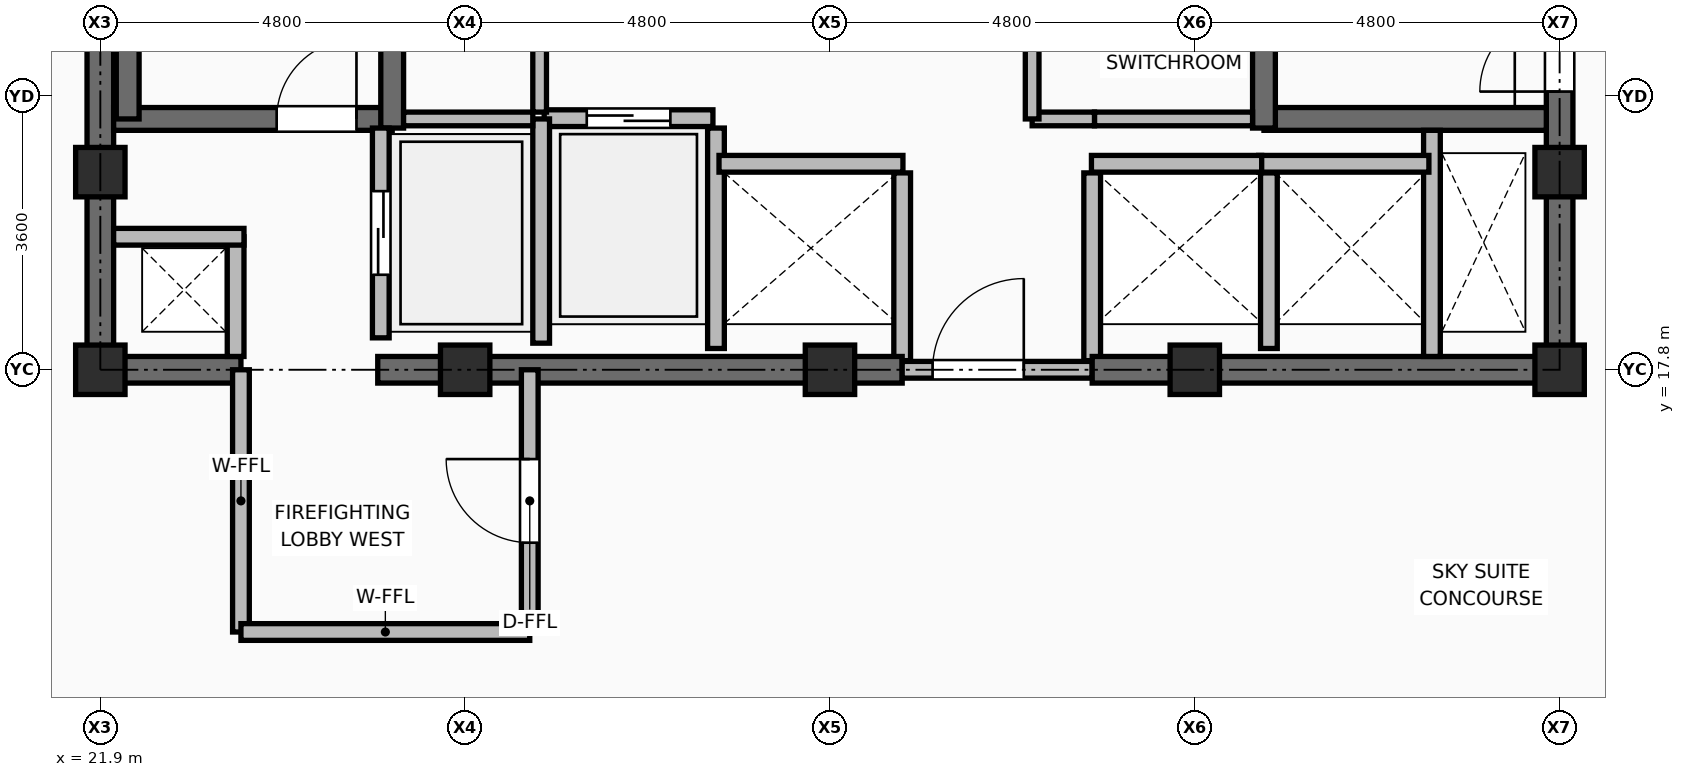
"""IFC4 building model, lengths in metres.
Left out: names, types, materials, properties, quantities, classifications, styles, units other than length and angle.
Written with IfcOpenShell. Run it as: python <this file> out.ifc"""

import sys

from ifc_helpers import new_model, si_unit, direction, frame, frame_2d, origin, origin_2d, place, context, subcontext, project, spatial, rectangle, extrude, element, fill, save


model = new_model("IFC4")
c1 = context("Model", 3, precision=1e-05, world=origin(), true_north=direction((0.0, 1.0)))
c2 = subcontext(c1, "Body", "Model", "MODEL_VIEW")
j1 = project(units=[si_unit("LENGTHUNIT", "METRE"), si_unit("PLANEANGLEUNIT", "RADIAN")], contexts=[c1])
p1 = place(None, origin())
s1 = spatial("IfcSite", under=j1, at=p1, CompositionType="ELEMENT")
p2 = place(p1, origin())
s2 = spatial("IfcBuilding", under=s1, at=p2, CompositionType="ELEMENT")
p3 = place(p2, frame((0.0, 0.0, 275.1)))
s3 = spatial("IfcBuildingStorey", under=s2, at=p3, CompositionType="ELEMENT", Elevation=275.1)
for number, where, z_axis, x_axis in (
    (1, (21.9, 17.8, 0.0), (0.0, 0.0, 1.0), (1.0, 0.0, 0.0)),
    (2, (26.7, 17.8, 0.0), (0.0, 0.0, 1.0), (1.0, 0.0, 0.0)),
    (3, (31.5, 17.8, 0.0), (0.0, 0.0, 1.0), (1.0, 0.0, 0.0)),
    (4, (36.3, 17.8, 0.0), (0.0, 0.0, 1.0), (1.0, 0.0, 0.0)),
    (5, (41.1, 17.8, 0.0), (0.0, 0.0, 1.0), (1.0, 0.0, 0.0)),
    (6, (21.9, 20.4, 0.0), (0.0, 0.0, 1.0), (1.0, 0.0, 0.0)),
    (7, (41.1, 20.4, 0.0), (0.0, 0.0, 1.0), (1.0, 0.0, 0.0)),
):
    element("IfcColumn", number, at=place(p3, frame(where, z_axis=z_axis, x_axis=x_axis)), inside=s3, PredefinedType="COLUMN", context=c2, shape_type="SweptSolid", body=[
        extrude(rectangle(XDim=0.65, YDim=0.65, at=origin_2d()), origin(), (0.0, 0.0, 1.0), 3.75),
    ])
p4 = place(p3, frame((30.0, 18.08, 0.0), z_axis=(0.0, 0.0, 1.0), x_axis=(0.0, 1.0, 0.0)))
e8 = element("IfcWall", 8, at=p4, inside=s3, PredefinedType="PARTITIONING", context=c2, shape_type="SweptSolid", body=[
    extrude(rectangle(XDim=2.9, YDim=0.22, at=frame_2d((1.45, 0.0))), origin(), (0.0, 0.0, 1.0), 3.545),
])
for number, where, z_axis, x_axis in (
    (9, (32.45, 17.92, 0.0), (0.0, 0.0, 1.0), (0.0, 1.0, 0.0)),
    (10, (34.95, 17.92, 0.0), (0.0, 0.0, 1.0), (0.0, 1.0, 0.0)),
):
    element("IfcWall", number, at=place(p3, frame(where, z_axis=z_axis, x_axis=x_axis)), inside=s3, PredefinedType="PARTITIONING", context=c2, shape_type="SweptSolid", body=[
        extrude(rectangle(XDim=2.47, YDim=0.22, at=frame_2d((1.235, 0.0))), origin(), (0.0, 0.0, 1.0), 3.545),
    ])
p5 = place(p3, frame((37.275, 18.08, 0.0), z_axis=(0.0, 0.0, 1.0), x_axis=(0.0, 1.0, 0.0)))
e11 = element("IfcWall", 11, at=p5, inside=s3, PredefinedType="PARTITIONING", context=c2, shape_type="SweptSolid", body=[
    extrude(rectangle(XDim=2.31, YDim=0.22, at=frame_2d((1.155, 0.0))), origin(), (0.0, 0.0, 1.0), 3.545),
])
p6 = place(p3, frame((21.725, 17.8, 0.0), z_axis=(0.0, 0.0, 1.0), x_axis=(1.0, 0.0, 0.0)))
e12 = element("IfcWall", 12, at=p6, inside=s3, PredefinedType="SHEAR", context=c2, shape_type="SweptSolid", body=[
    extrude(rectangle(XDim=2.025, YDim=0.35, at=frame_2d((1.012, 0.0))), origin(), (0.0, 0.0, 1.0), 3.57),
])
p7 = place(p3, frame((25.55, 17.8, 0.0), z_axis=(0.0, 0.0, 1.0), x_axis=(1.0, 0.0, 0.0)))
e13 = element("IfcWall", 13, at=p7, inside=s3, PredefinedType="SHEAR", context=c2, shape_type="SweptSolid", body=[
    extrude(rectangle(XDim=6.9, YDim=0.35, at=frame_2d((3.45, 0.0))), origin(), (0.0, 0.0, 1.0), 3.57),
])
p8 = place(p3, frame((32.45, 17.8, 0.0), z_axis=(0.0, 0.0, 1.0), x_axis=(1.0, 0.0, 0.0)))
e14 = element("IfcWall", 14, at=p8, inside=s3, PredefinedType="PARTITIONING", context=c2, shape_type="SweptSolid", body=[
    extrude(rectangle(XDim=2.5, YDim=0.22, at=frame_2d((1.25, 0.0))), origin(), (0.0, 0.0, 1.0), 3.132),
])
p9 = place(p8, frame((0.4, 0.0, 0.0)))
e15 = element("IfcOpeningElement", 15, at=p9, cuts=e14, PredefinedType="OPENING", context=c2, shape_type="SweptSolid", body=[
    extrude(rectangle(XDim=1.2, YDim=2.1, at=frame_2d((0.6, 1.05))), frame((0.0, 0.12, 0.0), z_axis=(0.0, -1.0, 0.0), x_axis=(1.0, 0.0, 0.0)), (0.0, 0.0, 1.0), 0.24),
])
p10 = place(p3, frame((34.95, 17.8, 0.0), z_axis=(0.0, 0.0, 1.0), x_axis=(1.0, 0.0, 0.0)))
e16 = element("IfcWall", 16, at=p10, inside=s3, PredefinedType="SHEAR", context=c2, shape_type="SweptSolid", body=[
    extrude(rectangle(XDim=6.325, YDim=0.35, at=frame_2d((3.163, 0.0))), origin(), (0.0, 0.0, 1.0), 3.57),
])
p11 = place(p3, frame((21.9, 17.975, 0.0), z_axis=(0.0, 0.0, 1.0), x_axis=(0.0, 1.0, 0.0)))
e17 = element("IfcWall", 17, at=p11, inside=s3, PredefinedType="SHEAR", context=c2, shape_type="SweptSolid", body=[
    extrude(rectangle(XDim=14.3, YDim=0.35, at=frame_2d((7.15, 0.0))), origin(), (0.0, 0.0, 1.0), 3.57),
])
p12 = place(p3, frame((41.1, 17.975, 0.0), z_axis=(0.0, 0.0, 1.0), x_axis=(0.0, 1.0, 0.0)))
e18 = element("IfcWall", 18, at=p12, inside=s3, PredefinedType="SHEAR", context=c2, shape_type="SweptSolid", body=[
    extrude(rectangle(XDim=14.3, YDim=0.35, at=frame_2d((7.15, 0.0))), origin(), (0.0, 0.0, 1.0), 3.57),
])
p13 = place(p12, frame((3.485, 0.0, 0.0)))
e19 = element("IfcOpeningElement", 19, at=p13, cuts=e18, PredefinedType="OPENING", context=c2, shape_type="SweptSolid", body=[
    extrude(rectangle(XDim=1.05, YDim=2.1, at=frame_2d((0.525, 1.05))), frame((0.0, 0.185, 0.0), z_axis=(0.0, -1.0, 0.0), x_axis=(1.0, 0.0, 0.0)), (0.0, 0.0, 1.0), 0.37),
])
p14 = place(p3, frame((22.075, 21.1, 0.0), z_axis=(0.0, 0.0, 1.0), x_axis=(1.0, 0.0, 0.0)))
e20 = element("IfcWall", 20, at=p14, inside=s3, PredefinedType="SHEAR", context=c2, shape_type="SweptSolid", body=[
    extrude(rectangle(XDim=3.665, YDim=0.3, at=frame_2d((1.833, 0.0))), origin(), (0.0, 0.0, 1.0), 3.57),
])
p15 = place(p14, frame((2.145, 0.0, 0.0)))
e21 = element("IfcOpeningElement", 21, at=p15, cuts=e20, PredefinedType="OPENING", context=c2, shape_type="SweptSolid", body=[
    extrude(rectangle(XDim=1.05, YDim=2.1, at=frame_2d((0.525, 1.05))), frame((0.0, 0.16, 0.0), z_axis=(0.0, -1.0, 0.0), x_axis=(1.0, 0.0, 0.0)), (0.0, 0.0, 1.0), 0.32),
])
p16 = place(p3, frame((25.74, 20.98, 0.0), z_axis=(0.0, 0.0, 1.0), x_axis=(0.0, 1.0, 0.0)))
e22 = element("IfcWall", 22, at=p16, inside=s3, PredefinedType="SHEAR", context=c2, shape_type="SweptSolid", body=[
    extrude(rectangle(XDim=7.99, YDim=0.3, at=frame_2d((3.995, 0.0))), origin(), (0.0, 0.0, 1.0), 3.57),
])
p17 = place(p3, frame((22.26, 21.1, 0.0), z_axis=(0.0, 0.0, 1.0), x_axis=(0.0, 1.0, 0.0)))
e23 = element("IfcWall", 23, at=p17, inside=s3, PredefinedType="SHEAR", context=c2, shape_type="SweptSolid", body=[
    extrude(rectangle(XDim=7.75, YDim=0.3, at=frame_2d((3.875, 0.0))), origin(), (0.0, 0.0, 1.0), 3.57),
])
p18 = place(p3, frame((37.21, 21.1, 0.0), z_axis=(0.0, 0.0, 1.0), x_axis=(1.0, 0.0, 0.0)))
e24 = element("IfcWall", 24, at=p18, inside=s3, PredefinedType="SHEAR", context=c2, shape_type="SweptSolid", body=[
    extrude(rectangle(XDim=3.715, YDim=0.3, at=frame_2d((1.857, 0.0))), origin(), (0.0, 0.0, 1.0), 3.57),
])
p19 = place(p3, frame((37.21, 20.98, 0.0), z_axis=(0.0, 0.0, 1.0), x_axis=(0.0, 1.0, 0.0)))
e25 = element("IfcWall", 25, at=p19, inside=s3, PredefinedType="SHEAR", context=c2, shape_type="SweptSolid", body=[
    extrude(rectangle(XDim=7.99, YDim=0.3, at=frame_2d((3.995, 0.0))), origin(), (0.0, 0.0, 1.0), 3.57),
])
p20 = place(p3, frame((23.68, 17.975, 0.0), z_axis=(0.0, 0.0, 1.0), x_axis=(0.0, 1.0, 0.0)))
e26 = element("IfcWall", 26, at=p20, inside=s3, PredefinedType="PARTITIONING", context=c2, shape_type="SweptSolid", body=[
    extrude(rectangle(XDim=1.575, YDim=0.22, at=frame_2d((0.788, 0.0))), origin(), (0.0, 0.0, 1.0), 3.132),
])
p21 = place(p3, frame((22.075, 19.55, 0.0), z_axis=(0.0, 0.0, 1.0), x_axis=(1.0, 0.0, 0.0)))
e27 = element("IfcWall", 27, at=p21, inside=s3, PredefinedType="PARTITIONING", context=c2, shape_type="SweptSolid", body=[
    extrude(rectangle(XDim=1.715, YDim=0.22, at=frame_2d((0.857, 0.0))), origin(), (0.0, 0.0, 1.0), 2.595),
])
p22 = place(p3, frame((39.42, 17.975, 0.0), z_axis=(0.0, 0.0, 1.0), x_axis=(0.0, 1.0, 0.0)))
e28 = element("IfcWall", 28, at=p22, inside=s3, PredefinedType="PARTITIONING", context=c2, shape_type="SweptSolid", body=[
    extrude(rectangle(XDim=2.975, YDim=0.22, at=frame_2d((1.487, 0.0))), origin(), (0.0, 0.0, 1.0), 3.132),
])
p23 = place(p3, frame((25.59, 18.22, 0.0), z_axis=(0.0, 0.0, 1.0), x_axis=(0.0, 1.0, 0.0)))
e29 = element("IfcWall", 29, at=p23, inside=s3, PredefinedType="PARTITIONING", context=c2, shape_type="SweptSolid", body=[
    extrude(rectangle(XDim=2.76, YDim=0.22, at=frame_2d((1.38, 0.0))), origin(), (0.0, 0.0, 1.0), 3.55),
])
p24 = place(p23, frame((0.83, 0.0, 0.0)))
e30 = element("IfcOpeningElement", 30, at=p24, cuts=e29, PredefinedType="OPENING", context=c2, shape_type="SweptSolid", body=[
    extrude(rectangle(XDim=1.1, YDim=2.2, at=frame_2d((0.55, 1.1))), frame((0.0, 0.12, 0.0), z_axis=(0.0, -1.0, 0.0), x_axis=(1.0, 0.0, 0.0)), (0.0, 0.0, 1.0), 0.24),
])
p25 = place(p3, frame((27.74, 21.11, 0.0), z_axis=(0.0, 0.0, 1.0), x_axis=(1.0, 0.0, 0.0)))
e31 = element("IfcWall", 31, at=p25, inside=s3, PredefinedType="PARTITIONING", context=c2, shape_type="SweptSolid", body=[
    extrude(rectangle(XDim=2.22, YDim=0.22, at=frame_2d((1.11, 0.0))), origin(), (0.0, 0.0, 1.0), 3.55),
])
p26 = place(p25, frame((0.56, 0.0, 0.0)))
e32 = element("IfcOpeningElement", 32, at=p26, cuts=e31, PredefinedType="OPENING", context=c2, shape_type="SweptSolid", body=[
    extrude(rectangle(XDim=1.1, YDim=2.2, at=frame_2d((0.55, 1.1))), frame((0.0, 0.12, 0.0), z_axis=(0.0, -1.0, 0.0), x_axis=(1.0, 0.0, 0.0)), (0.0, 0.0, 1.0), 0.24),
])
p27 = place(p3, frame((30.04, 20.51, 0.0), z_axis=(0.0, 0.0, 1.0), x_axis=(1.0, 0.0, 0.0)))
e33 = element("IfcWall", 33, at=p27, inside=s3, PredefinedType="PARTITIONING", context=c2, shape_type="SweptSolid", body=[
    extrude(rectangle(XDim=2.42, YDim=0.22, at=frame_2d((1.21, 0.0))), origin(), (0.0, 0.0, 1.0), 3.55),
])
for number, where, z_axis, x_axis in (
    (34, (37.14, 20.51, 0.0), (0.0, 0.0, 1.0), (1.0, 0.0, 0.0)),
    (35, (34.94, 20.51, 0.0), (0.0, 0.0, 1.0), (1.0, 0.0, 0.0)),
):
    element("IfcWall", number, at=place(p3, frame(where, z_axis=z_axis, x_axis=x_axis)), inside=s3, PredefinedType="PARTITIONING", context=c2, shape_type="SweptSolid", body=[
        extrude(rectangle(XDim=2.24, YDim=0.22, at=frame_2d((1.12, 0.0))), origin(), (0.0, 0.0, 1.0), 3.55),
    ])
p28 = place(p3, frame((27.7, 18.15, 0.0), z_axis=(0.0, 0.0, 1.0), x_axis=(0.0, 1.0, 0.0)))
e36 = element("IfcWall", 36, at=p28, inside=s3, PredefinedType="PARTITIONING", context=c2, shape_type="SweptSolid", body=[
    extrude(rectangle(XDim=2.95, YDim=0.22, at=frame_2d((1.475, 0.0))), origin(), (0.0, 0.0, 1.0), 3.55),
])
p29 = place(p3, frame((25.89, 21.1, 0.0), z_axis=(0.0, 0.0, 1.0), x_axis=(1.0, 0.0, 0.0)))
e37 = element("IfcWall", 37, at=p29, inside=s3, PredefinedType="PARTITIONING", context=c2, shape_type="SweptSolid", body=[
    extrude(rectangle(XDim=1.7, YDim=0.18, at=frame_2d((0.85, 0.0))), origin(), (0.0, 0.0, 1.0), 3.55),
])
p30 = place(p3, frame((27.68, 21.19, 0.0), z_axis=(0.0, 0.0, 1.0), x_axis=(0.0, 1.0, 0.0)))
e38 = element("IfcWall", 38, at=p30, inside=s3, PredefinedType="PARTITIONING", context=c2, shape_type="SweptSolid", body=[
    extrude(rectangle(XDim=1.39, YDim=0.18, at=frame_2d((0.695, 0.0))), origin(), (0.0, 0.0, 1.0), 3.55),
])
p31 = place(p3, frame((34.98, 21.1, 0.0), z_axis=(0.0, 0.0, 1.0), x_axis=(1.0, 0.0, 0.0)))
e39 = element("IfcWall", 39, at=p31, inside=s3, PredefinedType="PARTITIONING", context=c2, shape_type="SweptSolid", body=[
    extrude(rectangle(XDim=2.08, YDim=0.18, at=frame_2d((1.04, 0.0))), origin(), (0.0, 0.0, 1.0), 3.55),
])
p32 = place(p3, frame((34.16, 21.1, 0.0), z_axis=(0.0, 0.0, 1.0), x_axis=(1.0, 0.0, 0.0)))
e40 = element("IfcWall", 40, at=p32, inside=s3, PredefinedType="PARTITIONING", context=c2, shape_type="SweptSolid", body=[
    extrude(rectangle(XDim=0.82, YDim=0.18, at=frame_2d((0.41, 0.0))), origin(), (0.0, 0.0, 1.0), 3.55),
])
p33 = place(p3, frame((34.16, 21.1, 0.0), z_axis=(0.0, 0.0, 1.0), x_axis=(0.0, 1.0, 0.0)))
e41 = element("IfcWall", 41, at=p33, inside=s3, PredefinedType="PARTITIONING", context=c2, shape_type="SweptSolid", body=[
    extrude(rectangle(XDim=4.55, YDim=0.18, at=frame_2d((2.275, 0.0))), origin(), (0.0, 0.0, 1.0), 3.55),
])
p34 = place(p33, frame((1.825, 0.0, 0.0)))
e42 = element("IfcOpeningElement", 42, at=p34, cuts=e41, PredefinedType="OPENING", context=c2, shape_type="SweptSolid", body=[
    extrude(rectangle(XDim=0.9, YDim=2.1, at=frame_2d((0.45, 1.05))), frame((0.0, 0.1, 0.0), z_axis=(0.0, -1.0, 0.0), x_axis=(1.0, 0.0, 0.0)), (0.0, 0.0, 1.0), 0.2),
])
p35 = place(p3, frame((23.75, 14.35, 0.0), z_axis=(0.0, 0.0, 1.0), x_axis=(0.0, 1.0, 0.0)))
e43 = element("IfcWall", 43, at=p35, inside=s3, PredefinedType="PARTITIONING", context=c2, shape_type="SweptSolid", body=[
    extrude(rectangle(XDim=3.45, YDim=0.22, at=frame_2d((1.725, 0.0))), origin(), (0.0, 0.0, 1.0), 3.132),
])
p36 = place(p3, frame((23.75, 14.35, 0.0), z_axis=(0.0, 0.0, 1.0), x_axis=(1.0, 0.0, 0.0)))
e44 = element("IfcWall", 44, at=p36, inside=s3, PredefinedType="PARTITIONING", context=c2, shape_type="SweptSolid", body=[
    extrude(rectangle(XDim=3.8, YDim=0.22, at=frame_2d((1.9, 0.0))), origin(), (0.0, 0.0, 1.0), 3.55),
])
p37 = place(p3, frame((27.55, 14.35, 0.0), z_axis=(0.0, 0.0, 1.0), x_axis=(0.0, 1.0, 0.0)))
e45 = element("IfcWall", 45, at=p37, inside=s3, PredefinedType="PARTITIONING", context=c2, shape_type="SweptSolid", body=[
    extrude(rectangle(XDim=3.45, YDim=0.22, at=frame_2d((1.725, 0.0))), origin(), (0.0, 0.0, 1.0), 3.132),
])
p38 = place(p37, frame((1.175, 0.0, 0.0)))
e46 = element("IfcOpeningElement", 46, at=p38, cuts=e45, PredefinedType="OPENING", context=c2, shape_type="SweptSolid", body=[
    extrude(rectangle(XDim=1.1, YDim=2.1, at=frame_2d((0.55, 1.05))), frame((0.0, 0.12, 0.0), z_axis=(0.0, -1.0, 0.0), x_axis=(1.0, 0.0, 0.0)), (0.0, 0.0, 1.0), 0.24),
])
p39 = place(p9, origin())
e47 = element("IfcDoor", 47, at=p39, inside=s3, OperationType="SINGLE_SWING_RIGHT", PredefinedType="DOOR", context=c2, shape_type="SweptSolid", body=[
    extrude(rectangle(XDim=1.2, YDim=2.1, at=frame_2d((0.6, 1.05))), frame((0.0, 0.025, 0.0), z_axis=(0.0, -1.0, 0.0), x_axis=(1.0, 0.0, 0.0)), (0.0, 0.0, 1.0), 0.05),
])
fill(e15, e47)
p40 = place(p15, origin())
e48 = element("IfcDoor", 48, at=p40, inside=s3, OperationType="SINGLE_SWING_RIGHT", PredefinedType="DOOR", context=c2, shape_type="SweptSolid", body=[
    extrude(rectangle(XDim=1.05, YDim=2.1, at=frame_2d((0.525, 1.05))), frame((0.0, 0.025, 0.0), z_axis=(0.0, -1.0, 0.0), x_axis=(1.0, 0.0, 0.0)), (0.0, 0.0, 1.0), 0.05),
])
fill(e21, e48)
p41 = place(p13, origin())
e49 = element("IfcDoor", 49, at=p41, inside=s3, OperationType="SINGLE_SWING_LEFT", PredefinedType="DOOR", context=c2, shape_type="SweptSolid", body=[
    extrude(rectangle(XDim=1.05, YDim=2.1, at=frame_2d((0.525, 1.05))), frame((0.0, 0.025, 0.0), z_axis=(0.0, -1.0, 0.0), x_axis=(1.0, 0.0, 0.0)), (0.0, 0.0, 1.0), 0.05),
])
fill(e19, e49)
p42 = place(p24, origin())
e50 = element("IfcDoor", 50, at=p42, inside=s3, OperationType="DOUBLE_DOOR_SLIDING", PredefinedType="DOOR", context=c2, shape_type="SweptSolid", body=[
    extrude(rectangle(XDim=1.1, YDim=2.2, at=frame_2d((0.55, 1.1))), frame((0.0, 0.025, 0.0), z_axis=(0.0, -1.0, 0.0), x_axis=(1.0, 0.0, 0.0)), (0.0, 0.0, 1.0), 0.05),
])
fill(e30, e50)
p43 = place(p26, origin())
e51 = element("IfcDoor", 51, at=p43, inside=s3, OperationType="DOUBLE_DOOR_SLIDING", PredefinedType="DOOR", context=c2, shape_type="SweptSolid", body=[
    extrude(rectangle(XDim=1.1, YDim=2.2, at=frame_2d((0.55, 1.1))), frame((0.0, 0.025, 0.0), z_axis=(0.0, -1.0, 0.0), x_axis=(1.0, 0.0, 0.0)), (0.0, 0.0, 1.0), 0.05),
])
fill(e32, e51)
p44 = place(p38, origin())
e52 = element("IfcDoor", 52, at=p44, inside=s3, OperationType="SINGLE_SWING_RIGHT", PredefinedType="DOOR", context=c2, shape_type="SweptSolid", body=[
    extrude(rectangle(XDim=1.1, YDim=2.1, at=frame_2d((0.55, 1.05))), frame((0.0, 0.025, 0.0), z_axis=(0.0, -1.0, 0.0), x_axis=(1.0, 0.0, 0.0)), (0.0, 0.0, 1.0), 0.05),
])
fill(e46, e52)
save(model, sys.argv[1])
